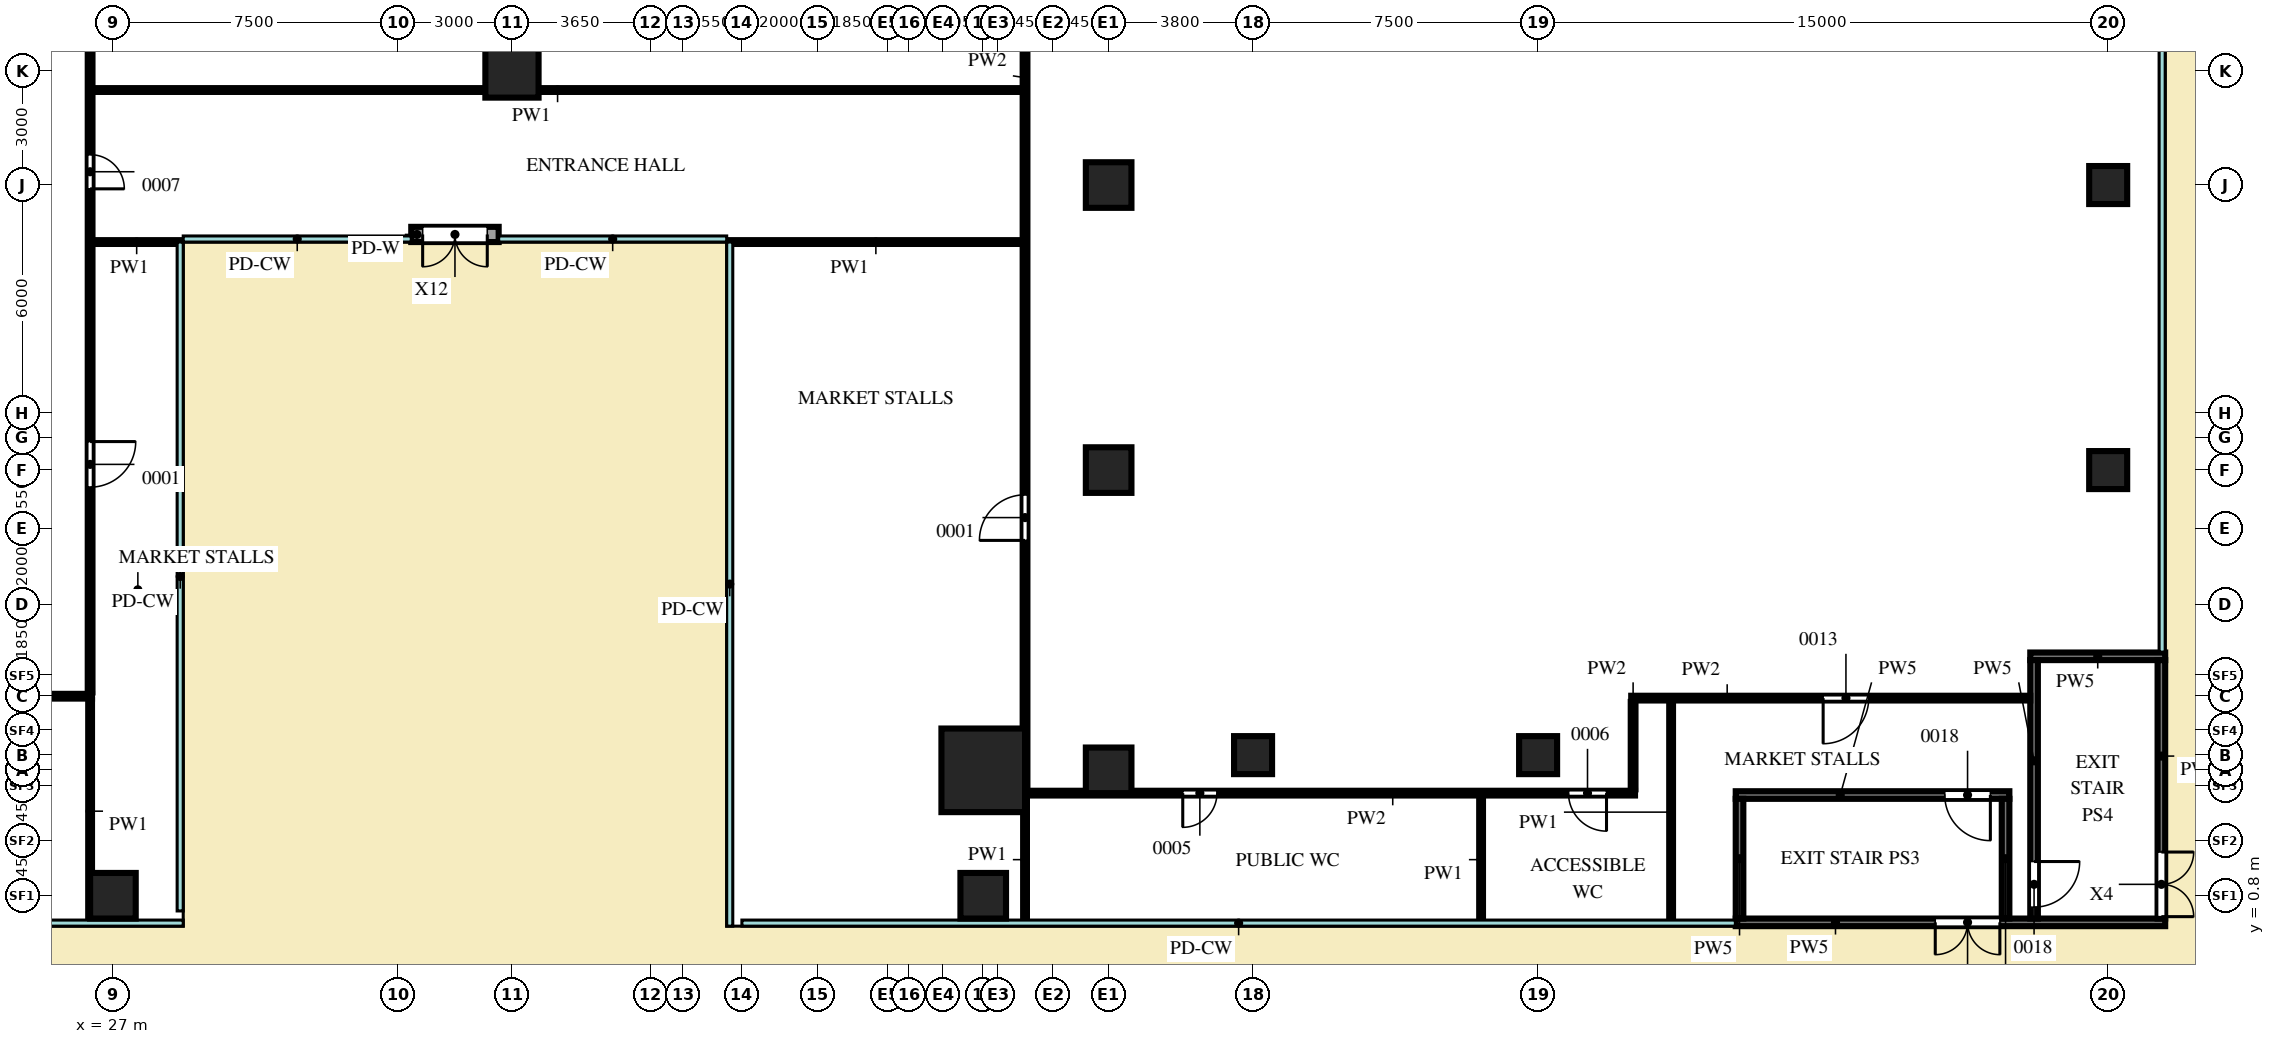
"""IFC4 building model, lengths in metres.
Left out: names, types, materials, properties, quantities, classifications, styles, units other than length and angle.
Written with IfcOpenShell. Run it as: python <this file> out.ifc"""

import sys

from ifc_helpers import new_model, si_unit, direction, frame, frame_2d, origin, origin_2d, place, context, subcontext, project, spatial, rectangle, extrude, source, transform, mapped, element, fill, save


model = new_model("IFC4")
c1 = context("Model", 3, precision=1e-05, world=origin(), true_north=direction((0.0, 1.0)))
c2 = subcontext(c1, "Body", "Model", "MODEL_VIEW")
j1 = project(units=[si_unit("LENGTHUNIT", "METRE"), si_unit("PLANEANGLEUNIT", "RADIAN")], contexts=[c1])
p1 = place(None, origin())
s1 = spatial("IfcSite", under=j1, at=p1, CompositionType="ELEMENT")
p2 = place(p1, origin())
s2 = spatial("IfcBuilding", under=s1, at=p2, CompositionType="ELEMENT")
p3 = place(p2, origin())
s3 = spatial("IfcBuildingStorey", under=s2, at=p3, CompositionType="ELEMENT", Elevation=0.0)
m1 = source(origin(), c2, "Body", "SweptSolid", [
    extrude(rectangle(XDim=2.2, YDim=2.2, at=origin_2d()), origin(), (0.0, 0.0, 1.0), 7.2),
])
p4 = place(p3, frame((49.9, 4.1, 0.0), z_axis=(0.0, 0.0, 1.0), x_axis=(1.0, 0.0, 0.0)))
e1 = element("IfcColumn", 1, at=p4, inside=s3, PredefinedType="COLUMN", context=c2, shape_type="MappedRepresentation", body=[
    mapped(m1, transform((0.0, 0.0, 0.0))),
])
m2 = source(origin(), c2, "Body", "SweptSolid", [
    extrude(rectangle(XDim=1.2, YDim=1.2, at=origin_2d()), origin(), (0.0, 0.0, 1.0), 7.2),
])
for number, where, z_axis, x_axis in (
    (2, (27.0, 0.8, 0.0), (0.0, 0.0, 1.0), (1.0, 0.0, 0.0)),
    (3, (49.9, 0.8, 0.0), (0.0, 0.0, 1.0), (1.0, 0.0, 0.0)),
    (4, (53.2, 4.1, 0.0), (0.0, 0.0, 1.0), (1.0, 0.0, 0.0)),
    (5, (53.2, 12.0, 0.0), (0.0, 0.0, 1.0), (1.0, 0.0, 0.0)),
    (6, (53.2, 19.5, 0.0), (0.0, 0.0, 1.0), (1.0, 0.0, 0.0)),
):
    element("IfcColumn", number, at=place(p3, frame(where, z_axis=z_axis, x_axis=x_axis)), inside=s3, PredefinedType="COLUMN", context=c2, shape_type="MappedRepresentation", body=[
        mapped(m2, transform((0.0, 0.0, 0.0))),
    ])
m3 = source(origin(), c2, "Body", "SweptSolid", [
    extrude(rectangle(XDim=1.4, YDim=1.4, at=origin_2d()), origin(), (0.0, 0.0, 1.0), 7.2),
])
p5 = place(p3, frame((37.5, 22.5, 0.0), z_axis=(0.0, 0.0, 1.0), x_axis=(1.0, 0.0, 0.0)))
e7 = element("IfcColumn", 7, at=p5, inside=s3, PredefinedType="COLUMN", context=c2, shape_type="MappedRepresentation", body=[
    mapped(m3, transform((0.0, 0.0, 0.0))),
])
m4 = source(origin(), c2, "Body", "SweptSolid", [
    extrude(rectangle(XDim=1.0, YDim=1.0, at=origin_2d()), origin(), (0.0, 0.0, 1.0), 7.2),
])
for number, where, z_axis, x_axis in (
    (8, (57.0, 4.5, 0.0), (0.0, 0.0, 1.0), (1.0, 0.0, 0.0)),
    (9, (64.5, 4.5, 0.0), (0.0, 0.0, 1.0), (1.0, 0.0, 0.0)),
    (10, (79.5, 12.0, 0.0), (0.0, 0.0, 1.0), (1.0, 0.0, 0.0)),
    (11, (79.5, 19.5, 0.0), (0.0, 0.0, 1.0), (1.0, 0.0, 0.0)),
):
    element("IfcColumn", number, at=place(p3, frame(where, z_axis=z_axis, x_axis=x_axis)), inside=s3, PredefinedType="COLUMN", context=c2, shape_type="MappedRepresentation", body=[
        mapped(m4, transform((0.0, 0.0, 0.0))),
    ])
m5 = source(origin(), c2, "Body", "SweptSolid", [
    extrude(rectangle(XDim=2.3, YDim=0.4, at=frame_2d((1.15, 0.0))), origin(), (0.0, 0.0, 1.0), 7.15),
])
p6 = place(p3, frame((34.85, 18.2, 0.0), z_axis=(0.0, 0.0, 1.0), x_axis=(1.0, 0.0, 0.0)))
e12 = element("IfcWall", 12, at=p6, inside=s3, PredefinedType="SOLIDWALL", context=c2, shape_type="MappedRepresentation", body=[
    mapped(m5, transform((0.0, 0.0, 0.0))),
])
m6 = source(origin(), c2, "Body", "SweptSolid", [
    extrude(rectangle(XDim=1.7, YDim=2.4, at=frame_2d((0.85, 1.2))), frame((0.0, 0.21, 0.0), z_axis=(0.0, -1.0, 0.0), x_axis=(1.0, 0.0, 0.0)), (0.0, 0.0, 1.0), 0.42),
])
p7 = place(p6, frame((2.0, 0.0, 0.0), z_axis=(0.0, 0.0, 1.0), x_axis=(-1.0, 0.0, 0.0)))
e13 = element("IfcOpeningElement", 13, at=p7, cuts=e12, PredefinedType="OPENING", context=c2, shape_type="MappedRepresentation", body=[
    mapped(m6, transform((0.0, 0.0, 0.0))),
])
m7 = source(origin(), c2, "Body", "SweptSolid", [
    extrude(rectangle(XDim=11.3, YDim=0.2, at=frame_2d((5.65, 0.0))), origin(), (0.0, 0.0, 1.0), 7.2),
])
p8 = place(p3, frame((69.7, 0.1, 0.0), z_axis=(0.0, 0.0, 1.0), x_axis=(1.0, 0.0, 0.0)))
e14 = element("IfcWall", 14, at=p8, inside=s3, PredefinedType="PARTITIONING", context=c2, shape_type="MappedRepresentation", body=[
    mapped(m7, transform((0.0, 0.0, 0.0))),
])
m8 = source(origin(), c2, "Body", "SweptSolid", [
    extrude(rectangle(XDim=1.7, YDim=2.4, at=frame_2d((0.85, 1.2))), frame((0.0, 0.11, 0.0), z_axis=(0.0, -1.0, 0.0), x_axis=(1.0, 0.0, 0.0)), (0.0, 0.0, 1.0), 0.22),
])
p9 = place(p8, frame((6.95, 0.0, 0.0), z_axis=(0.0, 0.0, 1.0), x_axis=(-1.0, 0.0, 0.0)))
e15 = element("IfcOpeningElement", 15, at=p9, cuts=e14, PredefinedType="OPENING", context=c2, shape_type="MappedRepresentation", body=[
    mapped(m8, transform((0.0, 0.0, 0.0))),
])
m9 = source(origin(), c2, "Body", "SweptSolid", [
    extrude(rectangle(XDim=7.2, YDim=0.2, at=frame_2d((3.6, 0.0))), origin(), (0.0, 0.0, 1.0), 7.2),
])
p10 = place(p3, frame((69.7, 3.45, 0.0), z_axis=(0.0, 0.0, 1.0), x_axis=(1.0, 0.0, 0.0)))
e16 = element("IfcWall", 16, at=p10, inside=s3, PredefinedType="PARTITIONING", context=c2, shape_type="MappedRepresentation", body=[
    mapped(m9, transform((0.0, 0.0, 0.0))),
])
m10 = source(origin(), c2, "Body", "SweptSolid", [
    extrude(rectangle(XDim=1.2, YDim=2.1, at=frame_2d((0.6, 1.05))), frame((0.0, 0.11, 0.0), z_axis=(0.0, -1.0, 0.0), x_axis=(1.0, 0.0, 0.0)), (0.0, 0.0, 1.0), 0.22),
])
p11 = place(p10, frame((5.5, 0.0, 0.0)))
e17 = element("IfcOpeningElement", 17, at=p11, cuts=e16, PredefinedType="OPENING", context=c2, shape_type="MappedRepresentation", body=[
    mapped(m10, transform((0.0, 0.0, 0.0))),
])
m11 = source(origin(), c2, "Body", "SweptSolid", [
    extrude(rectangle(XDim=3.15, YDim=0.2, at=frame_2d((1.575, 0.0))), origin(), (0.0, 0.0, 1.0), 7.2),
])
for number, where, z_axis, x_axis in (
    (18, (69.8, 0.2, 0.0), (0.0, 0.0, 1.0), (0.0, 1.0, 0.0)),
    (19, (76.8, 0.2, 0.0), (0.0, 0.0, 1.0), (0.0, 1.0, 0.0)),
):
    element("IfcWall", number, at=place(p3, frame(where, z_axis=z_axis, x_axis=x_axis)), inside=s3, PredefinedType="PARTITIONING", context=c2, shape_type="MappedRepresentation", body=[
        mapped(m11, transform((0.0, 0.0, 0.0))),
    ])
m12 = source(origin(), c2, "Body", "SweptSolid", [
    extrude(rectangle(XDim=3.55, YDim=0.2, at=frame_2d((1.775, 0.0))), origin(), (0.0, 0.0, 1.0), 7.2),
])
p12 = place(p3, frame((77.45, 7.1, 0.0), z_axis=(0.0, 0.0, 1.0), x_axis=(1.0, 0.0, 0.0)))
e20 = element("IfcWall", 20, at=p12, inside=s3, PredefinedType="PARTITIONING", context=c2, shape_type="MappedRepresentation", body=[
    mapped(m12, transform((0.0, 0.0, 0.0))),
])
m13 = source(origin(), c2, "Body", "SweptSolid", [
    extrude(rectangle(XDim=6.8, YDim=0.2, at=frame_2d((3.4, 0.0))), origin(), (0.0, 0.0, 1.0), 7.2),
])
p13 = place(p3, frame((77.55, 0.2, 0.0), z_axis=(0.0, 0.0, 1.0), x_axis=(0.0, 1.0, 0.0)))
e21 = element("IfcWall", 21, at=p13, inside=s3, PredefinedType="PARTITIONING", context=c2, shape_type="MappedRepresentation", body=[
    mapped(m13, transform((0.0, 0.0, 0.0))),
])
p14 = place(p13, frame((0.3, 0.0, 0.0)))
e22 = element("IfcOpeningElement", 22, at=p14, cuts=e21, PredefinedType="OPENING", context=c2, shape_type="MappedRepresentation", body=[
    mapped(m10, transform((0.0, 0.0, 0.0))),
])
p15 = place(p3, frame((80.9, 0.2, 0.0), z_axis=(0.0, 0.0, 1.0), x_axis=(0.0, 1.0, 0.0)))
e23 = element("IfcWall", 23, at=p15, inside=s3, PredefinedType="PARTITIONING", context=c2, shape_type="MappedRepresentation", body=[
    mapped(m13, transform((0.0, 0.0, 0.0))),
])
p16 = place(p15, frame((1.75, 0.0, 0.0), z_axis=(0.0, 0.0, 1.0), x_axis=(-1.0, 0.0, 0.0)))
e24 = element("IfcOpeningElement", 24, at=p16, cuts=e23, PredefinedType="OPENING", context=c2, shape_type="MappedRepresentation", body=[
    mapped(m8, transform((0.0, 0.0, 0.0))),
])
m14 = source(origin(), c2, "Body", "SweptSolid", [
    extrude(rectangle(XDim=5.85, YDim=0.1, at=frame_2d((2.925, 0.0))), origin(), (0.0, 0.0, 1.0), 7.2),
])
p17 = place(p3, frame((26.4, 0.1, 0.0), z_axis=(0.0, 0.0, 1.0), x_axis=(0.0, 1.0, 0.0)))
e25 = element("IfcWall", 25, at=p17, inside=s3, PredefinedType="PARTITIONING", context=c2, shape_type="MappedRepresentation", body=[
    mapped(m14, transform((0.0, 0.0, 0.0))),
])
m15 = source(origin(), c2, "Body", "SweptSolid", [
    extrude(rectangle(XDim=3.3, YDim=0.1, at=frame_2d((1.65, 0.0))), origin(), (0.0, 0.0, 1.0), 7.2),
])
for number, where, z_axis, x_axis in (
    (26, (51.0, 0.1, 0.0), (0.0, 0.0, 1.0), (0.0, 1.0, 0.0)),
    (27, (63.0, 0.1, 0.0), (0.0, 0.0, 1.0), (0.0, 1.0, 0.0)),
):
    element("IfcWall", number, at=place(p3, frame(where, z_axis=z_axis, x_axis=x_axis)), inside=s3, PredefinedType="PARTITIONING", context=c2, shape_type="MappedRepresentation", body=[
        mapped(m15, transform((0.0, 0.0, 0.0))),
    ])
m16 = source(origin(), c2, "Body", "SweptSolid", [
    extrude(rectangle(XDim=5.8, YDim=0.1, at=frame_2d((2.9, 0.0))), origin(), (0.0, 0.0, 1.0), 7.2),
])
p18 = place(p3, frame((68.0, 0.1, 0.0), z_axis=(0.0, 0.0, 1.0), x_axis=(0.0, 1.0, 0.0)))
e28 = element("IfcWall", 28, at=p18, inside=s3, PredefinedType="PARTITIONING", context=c2, shape_type="MappedRepresentation", body=[
    mapped(m16, transform((0.0, 0.0, 0.0))),
])
m17 = source(origin(), c2, "Body", "SweptSolid", [
    extrude(rectangle(XDim=16.1, YDim=0.125, at=frame_2d((8.05, 0.0))), origin(), (0.0, 0.0, 1.0), 7.2),
])
p19 = place(p3, frame((50.95, 3.5, 0.0), z_axis=(0.0, 0.0, 1.0), x_axis=(1.0, 0.0, 0.0)))
e29 = element("IfcWall", 29, at=p19, inside=s3, PredefinedType="PARTITIONING", context=c2, shape_type="MappedRepresentation", body=[
    mapped(m17, transform((0.0, 0.0, 0.0))),
])
m18 = source(origin(), c2, "Body", "SweptSolid", [
    extrude(rectangle(XDim=0.9, YDim=2.1, at=frame_2d((0.45, 1.05))), frame((0.0, 0.073, 0.0), z_axis=(0.0, -1.0, 0.0), x_axis=(1.0, 0.0, 0.0)), (0.0, 0.0, 1.0), 0.145),
])
p20 = place(p19, frame((4.2, 0.0, 0.0)))
e30 = element("IfcOpeningElement", 30, at=p20, cuts=e29, PredefinedType="OPENING", context=c2, shape_type="MappedRepresentation", body=[
    mapped(m18, transform((0.0, 0.0, 0.0))),
])
m19 = source(origin(), c2, "Body", "SweptSolid", [
    extrude(rectangle(XDim=1.0, YDim=2.1, at=frame_2d((0.5, 1.05))), frame((0.0, 0.073, 0.0), z_axis=(0.0, -1.0, 0.0), x_axis=(1.0, 0.0, 0.0)), (0.0, 0.0, 1.0), 0.145),
])
p21 = place(p19, frame((14.35, 0.0, 0.0)))
e31 = element("IfcOpeningElement", 31, at=p21, cuts=e29, PredefinedType="OPENING", context=c2, shape_type="MappedRepresentation", body=[
    mapped(m19, transform((0.0, 0.0, 0.0))),
])
m20 = source(origin(), c2, "Body", "SweptSolid", [
    extrude(rectangle(XDim=29.7, YDim=0.125, at=frame_2d((14.85, 0.0))), origin(), (0.0, 0.0, 1.0), 7.2),
])
p22 = place(p3, frame((51.0, 3.6, 0.0), z_axis=(0.0, 0.0, 1.0), x_axis=(0.0, 1.0, 0.0)))
e32 = element("IfcWall", 32, at=p22, inside=s3, PredefinedType="PARTITIONING", context=c2, shape_type="MappedRepresentation", body=[
    mapped(m20, transform((0.0, 0.0, 0.0))),
])
m21 = source(origin(), c2, "Body", "SweptSolid", [
    extrude(rectangle(XDim=1.2, YDim=2.1, at=frame_2d((0.6, 1.05))), frame((0.0, 0.073, 0.0), z_axis=(0.0, -1.0, 0.0), x_axis=(1.0, 0.0, 0.0)), (0.0, 0.0, 1.0), 0.145),
])
p23 = place(p22, frame((6.55, 0.0, 0.0)))
e33 = element("IfcOpeningElement", 33, at=p23, cuts=e32, PredefinedType="OPENING", context=c2, shape_type="MappedRepresentation", body=[
    mapped(m21, transform((0.0, 0.0, 0.0))),
])
m22 = source(origin(), c2, "Body", "SweptSolid", [
    extrude(rectangle(XDim=2.3, YDim=0.125, at=frame_2d((1.15, 0.0))), origin(), (0.0, 0.0, 1.0), 7.2),
])
p24 = place(p3, frame((67.0, 3.6, 0.0), z_axis=(0.0, 0.0, 1.0), x_axis=(0.0, 1.0, 0.0)))
e34 = element("IfcWall", 34, at=p24, inside=s3, PredefinedType="PARTITIONING", context=c2, shape_type="MappedRepresentation", body=[
    mapped(m22, transform((0.0, 0.0, 0.0))),
])
m23 = source(origin(), c2, "Body", "SweptSolid", [
    extrude(rectangle(XDim=10.5, YDim=0.125, at=frame_2d((5.25, 0.0))), origin(), (0.0, 0.0, 1.0), 7.2),
])
p25 = place(p3, frame((66.95, 6.0, 0.0), z_axis=(0.0, 0.0, 1.0), x_axis=(1.0, 0.0, 0.0)))
e35 = element("IfcWall", 35, at=p25, inside=s3, PredefinedType="PARTITIONING", context=c2, shape_type="MappedRepresentation", body=[
    mapped(m23, transform((0.0, 0.0, 0.0))),
])
p26 = place(p25, frame((5.05, 0.0, 0.0)))
e36 = element("IfcOpeningElement", 36, at=p26, cuts=e35, PredefinedType="OPENING", context=c2, shape_type="MappedRepresentation", body=[
    mapped(m21, transform((0.0, 0.0, 0.0))),
])
m24 = source(origin(), c2, "Body", "SweptSolid", [
    extrude(rectangle(XDim=10.35, YDim=0.125, at=frame_2d((5.175, 0.0))), origin(), (0.0, 0.0, 1.0), 7.2),
])
p27 = place(p3, frame((16.1, 6.05, 0.0), z_axis=(0.0, 0.0, 1.0), x_axis=(1.0, 0.0, 0.0)))
e37 = element("IfcWall", 37, at=p27, inside=s3, PredefinedType="PARTITIONING", context=c2, shape_type="MappedRepresentation", body=[
    mapped(m24, transform((0.0, 0.0, 0.0))),
])
p28 = place(p27, frame((3.5, 0.0, 0.0)))
e38 = element("IfcOpeningElement", 38, at=p28, cuts=e37, PredefinedType="OPENING", context=c2, shape_type="MappedRepresentation", body=[
    mapped(m18, transform((0.0, 0.0, 0.0))),
])
m25 = source(origin(), c2, "Body", "SweptSolid", [
    extrude(rectangle(XDim=27.15, YDim=0.125, at=frame_2d((13.575, 0.0))), origin(), (0.0, 0.0, 1.0), 7.2),
])
p29 = place(p3, frame((26.4, 6.15, 0.0), z_axis=(0.0, 0.0, 1.0), x_axis=(0.0, 1.0, 0.0)))
e39 = element("IfcWall", 39, at=p29, inside=s3, PredefinedType="PARTITIONING", context=c2, shape_type="MappedRepresentation", body=[
    mapped(m25, transform((0.0, 0.0, 0.0))),
])
p30 = place(p29, frame((5.4, 0.0, 0.0)))
e40 = element("IfcOpeningElement", 40, at=p30, cuts=e39, PredefinedType="OPENING", context=c2, shape_type="MappedRepresentation", body=[
    mapped(m21, transform((0.0, 0.0, 0.0))),
])
p31 = place(p29, frame((13.25, 0.0, 0.0)))
e41 = element("IfcOpeningElement", 41, at=p31, cuts=e39, PredefinedType="OPENING", context=c2, shape_type="MappedRepresentation", body=[
    mapped(m18, transform((0.0, 0.0, 0.0))),
])
m26 = source(origin(), c2, "Body", "SweptSolid", [
    extrude(rectangle(XDim=2.25, YDim=0.1, at=frame_2d((1.125, 0.0))), origin(), (0.0, 0.0, 1.0), 7.2),
])
p32 = place(p3, frame((26.5, 18.0, 0.0), z_axis=(0.0, 0.0, 1.0), x_axis=(1.0, 0.0, 0.0)))
e42 = element("IfcWall", 42, at=p32, inside=s3, PredefinedType="PARTITIONING", context=c2, shape_type="MappedRepresentation", body=[
    mapped(m26, transform((0.0, 0.0, 0.0))),
])
m27 = source(origin(), c2, "Body", "SweptSolid", [
    extrude(rectangle(XDim=7.65, YDim=0.1, at=frame_2d((3.825, 0.0))), origin(), (0.0, 0.0, 1.0), 7.2),
])
p33 = place(p3, frame((43.25, 18.0, 0.0), z_axis=(0.0, 0.0, 1.0), x_axis=(1.0, 0.0, 0.0)))
e43 = element("IfcWall", 43, at=p33, inside=s3, PredefinedType="PARTITIONING", context=c2, shape_type="MappedRepresentation", body=[
    mapped(m27, transform((0.0, 0.0, 0.0))),
])
m28 = source(origin(), c2, "Body", "SweptSolid", [
    extrude(rectangle(XDim=24.4, YDim=0.1, at=frame_2d((12.2, 0.0))), origin(), (0.0, 0.0, 1.0), 7.2),
])
p34 = place(p3, frame((26.5, 22.0, 0.0), z_axis=(0.0, 0.0, 1.0), x_axis=(1.0, 0.0, 0.0)))
e44 = element("IfcWall", 44, at=p34, inside=s3, PredefinedType="PARTITIONING", context=c2, shape_type="MappedRepresentation", body=[
    mapped(m28, transform((0.0, 0.0, 0.0))),
])
m29 = source(origin(), c2, "Body", "SweptSolid", [
    extrude(rectangle(XDim=1.7, YDim=2.4, at=frame_2d((0.85, 1.2))), frame((0.0, 0.025, 0.0), z_axis=(0.0, -1.0, 0.0), x_axis=(1.0, 0.0, 0.0)), (0.0, 0.0, 1.0), 0.05),
])
p35 = place(p7, origin())
e45 = element("IfcDoor", 45, at=p35, inside=s3, OperationType="DOUBLE_DOOR_SINGLE_SWING", PredefinedType="DOOR", context=c2, shape_type="MappedRepresentation", body=[
    mapped(m29, transform((0.0, 0.0, 0.0))),
])
fill(e13, e45)
m30 = source(origin(), c2, "Body", "SweptSolid", [
    extrude(rectangle(XDim=1.2, YDim=2.1, at=frame_2d((0.6, 1.05))), frame((0.0, 0.025, 0.0), z_axis=(0.0, -1.0, 0.0), x_axis=(1.0, 0.0, 0.0)), (0.0, 0.0, 1.0), 0.05),
])
p36 = place(p30, origin())
e46 = element("IfcDoor", 46, at=p36, inside=s3, OperationType="SINGLE_SWING_RIGHT", PredefinedType="DOOR", context=c2, shape_type="MappedRepresentation", body=[
    mapped(m30, transform((0.0, 0.0, 0.0))),
])
fill(e40, e46)
p37 = place(p23, origin())
e47 = element("IfcDoor", 47, at=p37, inside=s3, OperationType="SINGLE_SWING_RIGHT", PredefinedType="DOOR", context=c2, shape_type="MappedRepresentation", body=[
    mapped(m30, transform((0.0, 0.0, 0.0))),
])
fill(e33, e47)
m31 = source(origin(), c2, "Body", "SweptSolid", [
    extrude(rectangle(XDim=0.9, YDim=2.1, at=frame_2d((0.45, 1.05))), frame((0.0, 0.025, 0.0), z_axis=(0.0, -1.0, 0.0), x_axis=(1.0, 0.0, 0.0)), (0.0, 0.0, 1.0), 0.05),
])
p38 = place(p31, origin())
e48 = element("IfcDoor", 48, at=p38, inside=s3, OperationType="SINGLE_SWING_LEFT", PredefinedType="DOOR", context=c2, shape_type="MappedRepresentation", body=[
    mapped(m31, transform((0.0, 0.0, 0.0))),
])
fill(e41, e48)
p39 = place(p20, origin())
e49 = element("IfcDoor", 49, at=p39, inside=s3, OperationType="SINGLE_SWING_LEFT", PredefinedType="DOOR", context=c2, shape_type="MappedRepresentation", body=[
    mapped(m31, transform((0.0, 0.0, 0.0))),
])
fill(e30, e49)
m32 = source(origin(), c2, "Body", "SweptSolid", [
    extrude(rectangle(XDim=1.0, YDim=2.1, at=frame_2d((0.5, 1.05))), frame((0.0, 0.025, 0.0), z_axis=(0.0, -1.0, 0.0), x_axis=(1.0, 0.0, 0.0)), (0.0, 0.0, 1.0), 0.05),
])
p40 = place(p21, origin())
e50 = element("IfcDoor", 50, at=p40, inside=s3, OperationType="SINGLE_SWING_RIGHT", PredefinedType="DOOR", context=c2, shape_type="MappedRepresentation", body=[
    mapped(m32, transform((0.0, 0.0, 0.0))),
])
fill(e31, e50)
p41 = place(p26, origin())
e51 = element("IfcDoor", 51, at=p41, inside=s3, OperationType="SINGLE_SWING_LEFT", PredefinedType="DOOR", context=c2, shape_type="MappedRepresentation", body=[
    mapped(m30, transform((0.0, 0.0, 0.0))),
])
fill(e36, e51)
p42 = place(p11, origin())
e52 = element("IfcDoor", 52, at=p42, inside=s3, OperationType="SINGLE_SWING_RIGHT", PredefinedType="DOOR", context=c2, shape_type="MappedRepresentation", body=[
    mapped(m30, transform((0.0, 0.0, 0.0))),
])
fill(e17, e52)
p43 = place(p14, origin())
e53 = element("IfcDoor", 53, at=p43, inside=s3, OperationType="SINGLE_SWING_RIGHT", PredefinedType="DOOR", context=c2, shape_type="MappedRepresentation", body=[
    mapped(m30, transform((0.0, 0.0, 0.0))),
])
fill(e22, e53)
p44 = place(p9, origin())
e54 = element("IfcDoor", 54, at=p44, inside=s3, OperationType="DOUBLE_DOOR_SINGLE_SWING", PredefinedType="DOOR", context=c2, shape_type="MappedRepresentation", body=[
    mapped(m29, transform((0.0, 0.0, 0.0))),
])
fill(e15, e54)
p45 = place(p16, origin())
e55 = element("IfcDoor", 55, at=p45, inside=s3, OperationType="DOUBLE_DOOR_SINGLE_SWING", PredefinedType="DOOR", context=c2, shape_type="MappedRepresentation", body=[
    mapped(m29, transform((0.0, 0.0, 0.0))),
])
fill(e24, e55)
save(model, sys.argv[1])
